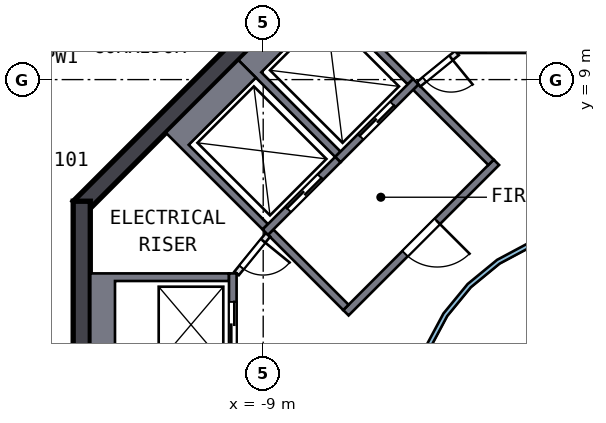
"""IFC4 building model, lengths in metres.
Left out: names, types, materials, properties, quantities, classifications, styles, units other than length and angle.
Written with IfcOpenShell. Run it as: python <this file> out.ifc"""

import sys

from ifc_helpers import new_model, si_unit, direction, frame, frame_2d, origin, place, context, subcontext, project, spatial, polyline, rectangle, outline, extrude, element, fill, save


model = new_model("IFC4")
c1 = context("Model", 3, precision=1e-05, world=origin(), true_north=direction((0.0, 1.0)))
c2 = subcontext(c1, "Body", "Model", "MODEL_VIEW")
j1 = project(units=[si_unit("LENGTHUNIT", "METRE"), si_unit("PLANEANGLEUNIT", "RADIAN")], contexts=[c1])
p1 = place(None, origin())
s1 = spatial("IfcSite", under=j1, at=p1, CompositionType="ELEMENT")
p2 = place(p1, origin())
s2 = spatial("IfcBuilding", under=s1, at=p2, CompositionType="ELEMENT")
p3 = place(p2, frame((0.0, 0.0, 306.5)))
s3 = spatial("IfcBuildingStorey", under=s2, at=p3, CompositionType="ELEMENT", Elevation=306.5)
p4 = place(p3, frame((-5.64, 13.841, 0.0), z_axis=(0.0, 0.0, 1.0), x_axis=(-0.707106781, -0.707106781, 0.0)))
e1 = element("IfcWall", 1, at=p4, inside=s3, PredefinedType="SHEAR", context=c2, shape_type="SweptSolid", body=[
    extrude(rectangle(XDim=11.598, YDim=0.45, at=frame_2d((5.799, 0.0))), origin(), (0.0, 0.0, 1.0), 3.5),
])
p5 = place(p3, frame((-13.775, 5.799, 0.0), z_axis=(0.0, 0.0, 1.0), x_axis=(0.0, -1.0, 0.0)))
e2 = element("IfcWall", 2, at=p5, inside=s3, PredefinedType="SHEAR", context=c2, shape_type="SweptSolid", body=[
    extrude(rectangle(XDim=11.598, YDim=0.45, at=frame_2d((5.799, 0.0))), origin(), (0.0, 0.0, 1.0), 3.5),
])
p6 = place(p5, frame((4.899, 0.0, 0.0)))
e3 = element("IfcOpeningElement", 3, at=p6, cuts=e2, PredefinedType="OPENING", context=c2, shape_type="SweptSolid", body=[
    extrude(rectangle(XDim=1.8, YDim=2.1, at=frame_2d((0.9, 1.05))), frame((0.0, 0.235, 0.0), z_axis=(0.0, -1.0, 0.0), x_axis=(1.0, 0.0, 0.0)), (0.0, 0.0, 1.0), 0.47),
])
p7 = place(p3, frame((-1.2, 9.8, 0.0), z_axis=(0.0, 0.0, 1.0), x_axis=(-1.0, 0.0, 0.0)))
e4 = element("IfcWall", 4, at=p7, inside=s3, PredefinedType="SOLIDWALL", context=c2, shape_type="SweptSolid", body=[
    extrude(rectangle(XDim=2.7, YDim=0.2, at=frame_2d((1.35, 0.0))), origin(), (0.0, 0.0, 1.0), 3.19),
])
p8 = place(p7, frame((0.75, 0.0, 0.0)))
e5 = element("IfcOpeningElement", 5, at=p8, cuts=e4, PredefinedType="OPENING", context=c2, shape_type="SweptSolid", body=[
    extrude(rectangle(XDim=1.2, YDim=2.1, at=frame_2d((0.6, 1.05))), frame((0.0, 0.11, 0.0), z_axis=(0.0, -1.0, 0.0), x_axis=(1.0, 0.0, 0.0)), (0.0, 0.0, 1.0), 0.22),
])
p9 = place(p3, origin())
e6 = element("IfcWall", 6, at=p9, inside=s3, PredefinedType="SOLIDWALL", context=c2, shape_type="SweptSolid", body=[
    extrude(outline(polyline([(-13.55, 3.9), (-9.9, 3.9), (-9.9, 3.7), (-12.9, 3.7), (-12.9, 1.4), (-9.9, 1.4), (-9.9, 1.2), (-13.55, 1.2), (-13.55, 3.9)])), origin(), (0.0, 0.0, 1.0), 3.19),
])
p10 = place(p3, frame((-9.8, 1.2, 0.0), z_axis=(0.0, 0.0, 1.0), x_axis=(0.0, 1.0, 0.0)))
e7 = element("IfcWall", 7, at=p10, inside=s3, PredefinedType="SOLIDWALL", context=c2, shape_type="SweptSolid", body=[
    extrude(rectangle(XDim=2.7, YDim=0.2, at=frame_2d((1.35, 0.0))), origin(), (0.0, 0.0, 1.0), 3.19),
])
p11 = place(p10, frame((0.75, 0.0, 0.0)))
e8 = element("IfcOpeningElement", 8, at=p11, cuts=e7, PredefinedType="OPENING", context=c2, shape_type="SweptSolid", body=[
    extrude(rectangle(XDim=1.2, YDim=2.1, at=frame_2d((0.6, 1.05))), frame((0.0, 0.11, 0.0), z_axis=(0.0, -1.0, 0.0), x_axis=(1.0, 0.0, 0.0)), (0.0, 0.0, 1.0), 0.22),
])
p12 = place(p3, origin())
e9 = element("IfcWall", 9, at=p12, inside=s3, PredefinedType="SOLIDWALL", context=c2, shape_type="SweptSolid", body=[
    extrude(outline(polyline([(-9.652, 9.51), (-7.601, 11.561), (-5.056, 9.016), (-5.197, 8.874), (-7.283, 10.96), (-9.051, 9.192), (-6.965, 7.106), (-7.106, 6.965), (-9.652, 9.51)])), origin(), (0.0, 0.0, 1.0), 3.19),
])
p13 = place(p3, frame((-4.985, 8.945, 0.0), z_axis=(0.0, 0.0, 1.0), x_axis=(-0.707106781, -0.707106781, 0.0)))
e10 = element("IfcWall", 10, at=p13, inside=s3, PredefinedType="SOLIDWALL", context=c2, shape_type="SweptSolid", body=[
    extrude(rectangle(XDim=2.9, YDim=0.2, at=frame_2d((1.45, 0.0))), origin(), (0.0, 0.0, 1.0), 3.19),
])
p14 = place(p13, frame((0.85, 0.0, 0.0)))
e11 = element("IfcOpeningElement", 11, at=p14, cuts=e10, PredefinedType="OPENING", context=c2, shape_type="SweptSolid", body=[
    extrude(rectangle(XDim=1.2, YDim=2.1, at=frame_2d((0.6, 1.05))), frame((0.0, 0.11, 0.0), z_axis=(0.0, -1.0, 0.0), x_axis=(1.0, 0.0, 0.0)), (0.0, 0.0, 1.0), 0.22),
])
p15 = place(p3, origin())
e12 = element("IfcWall", 12, at=p15, inside=s3, PredefinedType="SOLIDWALL", context=c2, shape_type="SweptSolid", body=[
    extrude(outline(polyline([(-11.561, 7.601), (-9.652, 9.51), (-9.192, 9.051), (-10.96, 7.283), (-8.874, 5.197), (-9.016, 5.056), (-11.561, 7.601)])), origin(), (0.0, 0.0, 1.0), 3.19),
])
p16 = place(p3, frame((-7.036, 6.894, 0.0), z_axis=(0.0, 0.0, 1.0), x_axis=(-0.707106781, -0.707106781, 0.0)))
e13 = element("IfcWall", 13, at=p16, inside=s3, PredefinedType="SOLIDWALL", context=c2, shape_type="SweptSolid", body=[
    extrude(rectangle(XDim=2.7, YDim=0.2, at=frame_2d((1.35, 0.0))), origin(), (0.0, 0.0, 1.0), 3.19),
])
p17 = place(p16, frame((0.65, 0.0, 0.0)))
e14 = element("IfcOpeningElement", 14, at=p17, cuts=e13, PredefinedType="OPENING", context=c2, shape_type="SweptSolid", body=[
    extrude(rectangle(XDim=1.2, YDim=2.1, at=frame_2d((0.6, 1.05))), frame((0.0, 0.11, 0.0), z_axis=(0.0, -1.0, 0.0), x_axis=(1.0, 0.0, 0.0)), (0.0, 0.0, 1.0), 0.22),
])
p18 = place(p3, frame((-2.864, 6.823, 0.0), z_axis=(0.0, 0.0, 1.0), x_axis=(-0.707106781, -0.707106781, 0.0)))
e15 = element("IfcWall", 15, at=p18, inside=s3, PredefinedType="SOLIDWALL", context=c2, shape_type="SweptSolid", body=[
    extrude(rectangle(XDim=5.6, YDim=0.2, at=frame_2d((2.8, 0.0))), origin(), (0.0, 0.0, 1.0), 3.19),
])
p19 = place(p18, frame((2.2, 0.0, 0.0)))
e16 = element("IfcOpeningElement", 16, at=p19, cuts=e15, PredefinedType="OPENING", context=c2, shape_type="SweptSolid", body=[
    extrude(rectangle(XDim=1.2, YDim=2.1, at=frame_2d((0.6, 1.05))), frame((0.0, 0.11, 0.0), z_axis=(0.0, -1.0, 0.0), x_axis=(1.0, 0.0, 0.0)), (0.0, 0.0, 1.0), 0.22),
])
for number, where, z_axis, x_axis in (
    (17, (-3.005, 6.823, 0.0), (0.0, 0.0, 1.0), (-0.707, 0.707, 0.0)),
    (18, (-6.823, 3.005, 0.0), (0.0, 0.0, 1.0), (-0.707, 0.707, 0.0)),
):
    element("IfcWall", number, at=place(p3, frame(where, z_axis=z_axis, x_axis=x_axis)), inside=s3, PredefinedType="SOLIDWALL", context=c2, shape_type="SweptSolid", body=[
        extrude(rectangle(XDim=2.8, YDim=0.2, at=frame_2d((1.4, 0.0))), origin(), (0.0, 0.0, 1.0), 3.19),
    ])
p20 = place(p3, frame((-3.9, 9.7, 0.0), z_axis=(0.0, 0.0, 1.0), x_axis=(-0.775559878, -0.631274009, 0.0)))
e19 = element("IfcWall", 19, at=p20, inside=s3, PredefinedType="PARTITIONING", context=c2, shape_type="SweptSolid", body=[
    extrude(rectangle(XDim=1.308, YDim=0.15, at=frame_2d((0.654, 0.0))), origin(), (0.0, 0.0, 1.0), 3.19),
])
p21 = place(p20, frame((0.204, 0.0, 0.0)))
e20 = element("IfcOpeningElement", 20, at=p21, cuts=e19, PredefinedType="OPENING", context=c2, shape_type="SweptSolid", body=[
    extrude(rectangle(XDim=0.9, YDim=2.1, at=frame_2d((0.45, 1.05))), frame((0.0, 0.085, 0.0), z_axis=(0.0, -1.0, 0.0), x_axis=(1.0, 0.0, 0.0)), (0.0, 0.0, 1.0), 0.17),
])
p22 = place(p3, frame((-8.874, 4.914, 0.0), z_axis=(0.0, 0.0, 1.0), x_axis=(-0.631274009, -0.775559878, 0.0)))
e21 = element("IfcWall", 21, at=p22, inside=s3, PredefinedType="PARTITIONING", context=c2, shape_type="SweptSolid", body=[
    extrude(rectangle(XDim=1.308, YDim=0.15, at=frame_2d((0.654, 0.0))), origin(), (0.0, 0.0, 1.0), 3.19),
])
p23 = place(p22, frame((0.204, 0.0, 0.0)))
e22 = element("IfcOpeningElement", 22, at=p23, cuts=e21, PredefinedType="OPENING", context=c2, shape_type="SweptSolid", body=[
    extrude(rectangle(XDim=0.9, YDim=2.1, at=frame_2d((0.45, 1.05))), frame((0.0, 0.085, 0.0), z_axis=(0.0, -1.0, 0.0), x_axis=(1.0, 0.0, 0.0)), (0.0, 0.0, 1.0), 0.17),
])
p24 = place(p3, origin())
e23 = element("IfcWall", 23, at=p24, inside=s3, PredefinedType="SOLIDWALL", context=c2, shape_type="SweptSolid", body=[
    extrude(outline(polyline([(5.021, -0.999), (4.73, -1.959), (4.257, -2.844), (3.62, -3.62), (2.844, -4.257), (1.959, -4.73), (0.999, -5.021), (0.0, -5.12), (-0.999, -5.021), (-1.959, -4.73), (-2.844, -4.257), (-3.62, -3.62), (-4.257, -2.844), (-4.73, -1.959), (-5.021, -0.999), (-5.12, 0.0), (-5.021, 0.999), (-4.73, 1.959), (-4.257, 2.844), (-3.62, 3.62), (-2.844, 4.257), (-1.959, 4.73), (-0.999, 5.021), (0.0, 5.12), (0.999, 5.021), (1.959, 4.73), (2.844, 4.257), (3.62, 3.62), (4.257, 2.844), (4.73, 1.959), (5.021, 0.999), (5.12, 0.0), (5.021, -0.999)]), holes=[polyline([(4.904, 0.976), (4.619, 1.913), (4.157, 2.778), (3.535, 3.535), (2.778, 4.157), (1.913, 4.619), (0.976, 4.904), (0.0, 5.0), (-0.976, 4.904), (-1.913, 4.619), (-2.778, 4.157), (-3.535, 3.535), (-4.157, 2.778), (-4.619, 1.913), (-4.904, 0.976), (-5.0, 0.0), (-4.904, -0.976), (-4.619, -1.913), (-4.157, -2.778), (-3.535, -3.535), (-2.778, -4.157), (-1.913, -4.619), (-0.976, -4.904), (0.0, -5.0), (0.976, -4.904), (1.913, -4.619), (2.778, -4.157), (3.535, -3.535), (4.157, -2.778), (4.619, -1.913), (4.904, -0.976), (5.0, 0.0), (4.904, 0.976)])]), origin(), (0.0, 0.0, 1.0), 3.19),
])
p25 = place(p3, frame((-18.215, 2.495, 0.0), z_axis=(0.0, 0.0, 1.0), x_axis=(0.387500695, 0.921869411, 0.0)))
e24 = element("IfcWall", 24, at=p25, inside=s3, PredefinedType="SOLIDWALL", context=c2, shape_type="SweptSolid", body=[
    extrude(rectangle(XDim=9.517, YDim=0.2, at=frame_2d((4.758, 0.0))), origin(), (0.0, 0.0, 1.0), 3.19),
])
p26 = place(p25, frame((3.834, 0.0, 0.0)))
e25 = element("IfcOpeningElement", 25, at=p26, cuts=e24, PredefinedType="OPENING", context=c2, shape_type="SweptSolid", body=[
    extrude(rectangle(XDim=1.8, YDim=2.1, at=frame_2d((0.9, 1.05))), frame((0.0, 0.11, 0.0), z_axis=(0.0, -1.0, 0.0), x_axis=(1.0, 0.0, 0.0)), (0.0, 0.0, 1.0), 0.22),
])
p27 = place(p11, origin())
e26 = element("IfcDoor", 26, at=p27, inside=s3, OperationType="DOUBLE_DOOR_SLIDING", PredefinedType="DOOR", context=c2, shape_type="SweptSolid", body=[
    extrude(rectangle(XDim=1.2, YDim=2.1, at=frame_2d((0.6, 1.05))), frame((0.0, 0.025, 0.0), z_axis=(0.0, -1.0, 0.0), x_axis=(1.0, 0.0, 0.0)), (0.0, 0.0, 1.0), 0.05),
])
fill(e8, e26)
p28 = place(p14, origin())
e27 = element("IfcDoor", 27, at=p28, inside=s3, OperationType="DOUBLE_DOOR_SLIDING", PredefinedType="DOOR", context=c2, shape_type="SweptSolid", body=[
    extrude(rectangle(XDim=1.2, YDim=2.1, at=frame_2d((0.6, 1.05))), frame((0.0, 0.025, 0.0), z_axis=(0.0, -1.0, 0.0), x_axis=(1.0, 0.0, 0.0)), (0.0, 0.0, 1.0), 0.05),
])
fill(e11, e27)
p29 = place(p17, origin())
e28 = element("IfcDoor", 28, at=p29, inside=s3, OperationType="DOUBLE_DOOR_SLIDING", PredefinedType="DOOR", context=c2, shape_type="SweptSolid", body=[
    extrude(rectangle(XDim=1.2, YDim=2.1, at=frame_2d((0.6, 1.05))), frame((0.0, 0.025, 0.0), z_axis=(0.0, -1.0, 0.0), x_axis=(1.0, 0.0, 0.0)), (0.0, 0.0, 1.0), 0.05),
])
fill(e14, e28)
p30 = place(p19, origin())
e29 = element("IfcDoor", 29, at=p30, inside=s3, OperationType="SINGLE_SWING_LEFT", PredefinedType="DOOR", context=c2, shape_type="SweptSolid", body=[
    extrude(rectangle(XDim=1.2, YDim=2.1, at=frame_2d((0.6, 1.05))), frame((0.0, 0.025, 0.0), z_axis=(0.0, -1.0, 0.0), x_axis=(1.0, 0.0, 0.0)), (0.0, 0.0, 1.0), 0.05),
])
fill(e16, e29)
p31 = place(p21, origin())
e30 = element("IfcDoor", 30, at=p31, inside=s3, OperationType="SINGLE_SWING_LEFT", PredefinedType="DOOR", context=c2, shape_type="SweptSolid", body=[
    extrude(rectangle(XDim=0.9, YDim=2.1, at=frame_2d((0.45, 1.05))), frame((0.0, 0.025, 0.0), z_axis=(0.0, -1.0, 0.0), x_axis=(1.0, 0.0, 0.0)), (0.0, 0.0, 1.0), 0.05),
])
fill(e20, e30)
p32 = place(p23, origin())
e31 = element("IfcDoor", 31, at=p32, inside=s3, OperationType="SINGLE_SWING_LEFT", PredefinedType="DOOR", context=c2, shape_type="SweptSolid", body=[
    extrude(rectangle(XDim=0.9, YDim=2.1, at=frame_2d((0.45, 1.05))), frame((0.0, 0.025, 0.0), z_axis=(0.0, -1.0, 0.0), x_axis=(1.0, 0.0, 0.0)), (0.0, 0.0, 1.0), 0.05),
])
fill(e22, e31)
save(model, sys.argv[1])
